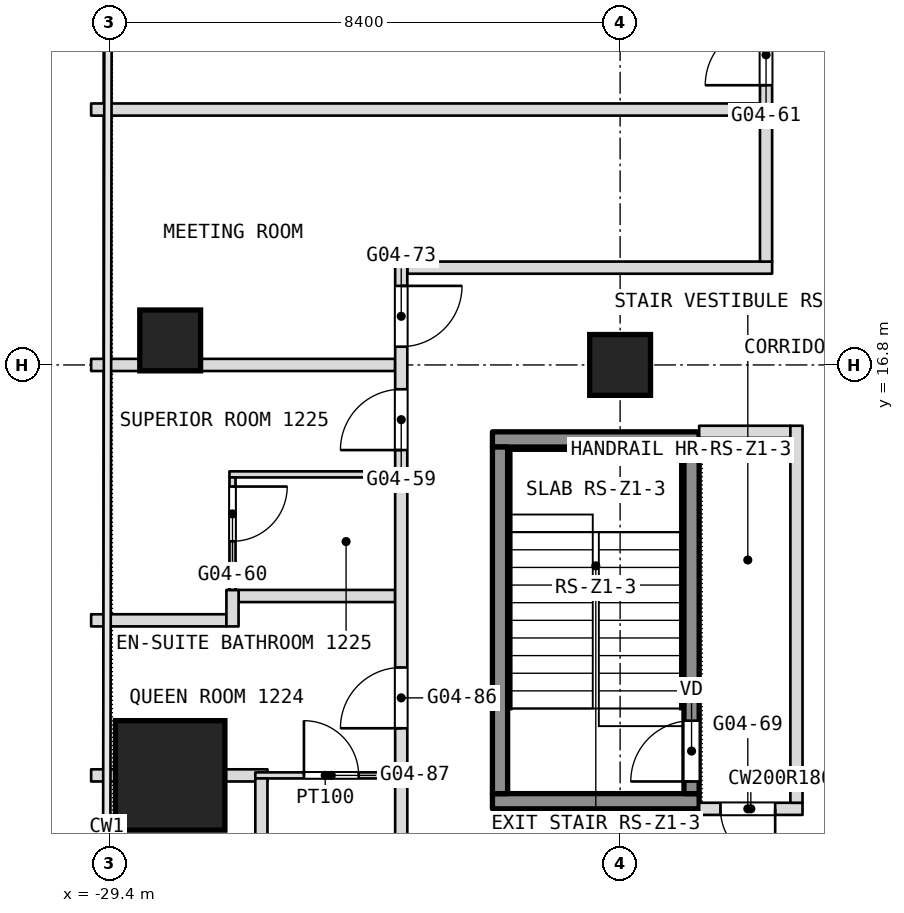
"""IFC4 building model, lengths in metres.
Left out: names, types, materials, properties, quantities, classifications, styles, units other than length and angle.
Written with IfcOpenShell. Run it as: python <this file> out.ifc"""

import sys

from ifc_helpers import new_model, si_unit, direction, frame, frame_2d, origin, origin_2d, place, context, subcontext, project, spatial, rectangle, extrude, element, fill, save


model = new_model("IFC4")
c1 = context("Model", 3, precision=1e-05, world=origin(), true_north=direction((0.0, 1.0)))
c2 = subcontext(c1, "Body", "Model", "MODEL_VIEW")
j1 = project(units=[si_unit("LENGTHUNIT", "METRE"), si_unit("PLANEANGLEUNIT", "RADIAN")], contexts=[c1])
p1 = place(None, origin())
s1 = spatial("IfcSite", under=j1, at=p1, CompositionType="ELEMENT")
p2 = place(p1, origin())
s2 = spatial("IfcBuilding", under=s1, at=p2, CompositionType="ELEMENT")
p3 = place(p2, frame((0.0, 0.0, 58.1)))
s3 = spatial("IfcBuildingStorey", under=s2, at=p3, CompositionType="ELEMENT", Elevation=58.1)
p4 = place(p3, frame((-28.4, 10.05, 0.0), z_axis=(0.0, 0.0, 1.0), x_axis=(1.0, 0.0, 0.0)))
e1 = element("IfcColumn", 1, at=p4, inside=s3, PredefinedType="COLUMN", context=c2, shape_type="SweptSolid", body=[
    extrude(rectangle(XDim=1.8, YDim=1.8, at=origin_2d()), origin(), (0.0, 0.0, 1.0), 3.6),
])
for number, where, z_axis, x_axis in (
    (2, (-21.0, 16.8, 0.0), (0.0, 0.0, 1.0), (1.0, 0.0, 0.0)),
    (3, (-28.4, 17.203, 0.0), (0.0, 0.0, 1.0), (1.0, 0.0, 0.0)),
):
    element("IfcColumn", number, at=place(p3, frame(where, z_axis=z_axis, x_axis=x_axis)), inside=s3, PredefinedType="COLUMN", context=c2, shape_type="SweptSolid", body=[
        extrude(rectangle(XDim=1.0, YDim=1.0, at=origin_2d()), origin(), (0.0, 0.0, 1.0), 3.6),
    ])
p5 = place(p3, frame((-19.7, 9.5, 0.0), z_axis=(0.0, 0.0, 1.0), x_axis=(1.0, 0.0, 0.0)))
e4 = element("IfcWall", 4, at=p5, inside=s3, PredefinedType="PARTITIONING", context=c2, shape_type="SweptSolid", body=[
    extrude(rectangle(XDim=1.7, YDim=0.2, at=frame_2d((0.85, 0.0))), origin(), (0.0, 0.0, 1.0), 3.34),
])
p6 = place(p5, frame((0.35, 0.0, 0.0)))
e5 = element("IfcOpeningElement", 5, at=p6, cuts=e4, PredefinedType="OPENING", context=c2, shape_type="SweptSolid", body=[
    extrude(rectangle(XDim=0.9, YDim=2.1, at=frame_2d((0.45, 1.05))), frame((0.0, 0.1, 0.0), z_axis=(0.0, -1.0, 0.0), x_axis=(1.0, 0.0, 0.0)), (0.0, 0.0, 1.0), 0.2),
])
p7 = place(p3, frame((-29.7, 10.05, 0.0), z_axis=(0.0, 0.0, 1.0), x_axis=(1.0, 0.0, 0.0)))
e6 = element("IfcWall", 6, at=p7, inside=s3, PredefinedType="PARTITIONING", context=c2, shape_type="SweptSolid", body=[
    extrude(rectangle(XDim=0.4, YDim=0.2, at=frame_2d((0.2, 0.0))), origin(), (0.0, 0.0, 1.0), 3.34),
])
p8 = place(p3, frame((-27.5, 10.05, 0.0), z_axis=(0.0, 0.0, 1.0), x_axis=(1.0, 0.0, 0.0)))
e7 = element("IfcWall", 7, at=p8, inside=s3, PredefinedType="PARTITIONING", context=c2, shape_type="SweptSolid", body=[
    extrude(rectangle(XDim=0.7, YDim=0.2, at=frame_2d((0.35, 0.0))), origin(), (0.0, 0.0, 1.0), 3.34),
])
p9 = place(p3, frame((-27.0, 10.05, 0.0), z_axis=(0.0, 0.0, 1.0), x_axis=(1.0, 0.0, 0.0)))
e8 = element("IfcWall", 8, at=p9, inside=s3, PredefinedType="PARTITIONING", context=c2, shape_type="SweptSolid", body=[
    extrude(rectangle(XDim=2.3, YDim=0.1, at=frame_2d((1.15, 0.0))), origin(), (0.0, 0.0, 1.0), 3.34),
])
p10 = place(p9, frame((0.8, 0.0, 0.0)))
e9 = element("IfcOpeningElement", 9, at=p10, cuts=e8, PredefinedType="OPENING", context=c2, shape_type="SweptSolid", body=[
    extrude(rectangle(XDim=0.9, YDim=2.1, at=frame_2d((0.45, 1.05))), frame((0.0, 0.05, 0.0), z_axis=(0.0, -1.0, 0.0), x_axis=(1.0, 0.0, 0.0)), (0.0, 0.0, 1.0), 0.1),
])
p11 = place(p3, frame((-29.7, 12.6, 0.0), z_axis=(0.0, 0.0, 1.0), x_axis=(1.0, 0.0, 0.0)))
e10 = element("IfcWall", 10, at=p11, inside=s3, PredefinedType="PARTITIONING", context=c2, shape_type="SweptSolid", body=[
    extrude(rectangle(XDim=2.225, YDim=0.2, at=frame_2d((1.112, 0.0))), origin(), (0.0, 0.0, 1.0), 3.34),
])
p12 = place(p3, frame((-27.275, 13.0, 0.0), z_axis=(0.0, 0.0, 1.0), x_axis=(1.0, 0.0, 0.0)))
e11 = element("IfcWall", 11, at=p12, inside=s3, PredefinedType="PARTITIONING", context=c2, shape_type="SweptSolid", body=[
    extrude(rectangle(XDim=2.575, YDim=0.2, at=frame_2d((1.288, 0.0))), origin(), (0.0, 0.0, 1.0), 3.34),
])
p13 = place(p3, frame((-27.425, 15.0, 0.0), z_axis=(0.0, 0.0, 1.0), x_axis=(1.0, 0.0, 0.0)))
e12 = element("IfcWall", 12, at=p13, inside=s3, PredefinedType="PARTITIONING", context=c2, shape_type="SweptSolid", body=[
    extrude(rectangle(XDim=2.725, YDim=0.1, at=frame_2d((1.363, 0.0))), origin(), (0.0, 0.0, 1.0), 3.34),
])
p14 = place(p3, frame((-19.7, 15.7, 0.0), z_axis=(0.0, 0.0, 1.0), x_axis=(1.0, 0.0, 0.0)))
e13 = element("IfcWall", 13, at=p14, inside=s3, PredefinedType="PARTITIONING", context=c2, shape_type="SweptSolid", body=[
    extrude(rectangle(XDim=1.5, YDim=0.2, at=frame_2d((0.75, 0.0))), origin(), (0.0, 0.0, 1.0), 3.34),
])
p15 = place(p3, frame((-29.7, 16.8, 0.0), z_axis=(0.0, 0.0, 1.0), x_axis=(1.0, 0.0, 0.0)))
e14 = element("IfcWall", 14, at=p15, inside=s3, PredefinedType="PARTITIONING", context=c2, shape_type="SweptSolid", body=[
    extrude(rectangle(XDim=5.0, YDim=0.2, at=frame_2d((2.5, 0.0))), origin(), (0.0, 0.0, 1.0), 2.84),
])
p16 = place(p3, frame((-18.1, 9.6, 0.0), z_axis=(0.0, 0.0, 1.0), x_axis=(0.0, 1.0, 0.0)))
e15 = element("IfcWall", 15, at=p16, inside=s3, PredefinedType="PARTITIONING", context=c2, shape_type="SweptSolid", body=[
    extrude(rectangle(XDim=6.2, YDim=0.2, at=frame_2d((3.1, 0.0))), origin(), (0.0, 0.0, 1.0), 3.34),
])
p17 = place(p3, frame((-24.5, 18.4, 0.0), z_axis=(0.0, 0.0, 1.0), x_axis=(1.0, 0.0, 0.0)))
e16 = element("IfcWall", 16, at=p17, inside=s3, PredefinedType="PARTITIONING", context=c2, shape_type="SweptSolid", body=[
    extrude(rectangle(XDim=6.0, YDim=0.2, at=frame_2d((3.0, 0.0))), origin(), (0.0, 0.0, 1.0), 3.34),
])
p18 = place(p3, frame((-18.6, 18.5, 0.0), z_axis=(0.0, 0.0, 1.0), x_axis=(0.0, 1.0, 0.0)))
e17 = element("IfcWall", 17, at=p18, inside=s3, PredefinedType="PARTITIONING", context=c2, shape_type="SweptSolid", body=[
    extrude(rectangle(XDim=15.04, YDim=0.2, at=frame_2d((7.52, 0.0))), origin(), (0.0, 0.0, 1.0), 3.34),
])
p19 = place(p18, frame((2.9, 0.0, 0.0)))
e18 = element("IfcOpeningElement", 18, at=p19, cuts=e17, PredefinedType="OPENING", context=c2, shape_type="SweptSolid", body=[
    extrude(rectangle(XDim=1.0, YDim=2.1, at=frame_2d((0.5, 1.05))), frame((0.0, 0.1, 0.0), z_axis=(0.0, -1.0, 0.0), x_axis=(1.0, 0.0, 0.0)), (0.0, 0.0, 1.0), 0.2),
])
p20 = place(p18, frame((7.1, 0.0, 0.0)))
e19 = element("IfcOpeningElement", 19, at=p20, cuts=e17, PredefinedType="OPENING", context=c2, shape_type="SweptSolid", body=[
    extrude(rectangle(XDim=1.0, YDim=2.1, at=frame_2d((0.5, 1.05))), frame((0.0, 0.1, 0.0), z_axis=(0.0, -1.0, 0.0), x_axis=(1.0, 0.0, 0.0)), (0.0, 0.0, 1.0), 0.2),
])
p21 = place(p18, frame((11.2, 0.0, 0.0)))
e20 = element("IfcOpeningElement", 20, at=p21, cuts=e17, PredefinedType="OPENING", context=c2, shape_type="SweptSolid", body=[
    extrude(rectangle(XDim=1.0, YDim=2.1, at=frame_2d((0.5, 1.05))), frame((0.0, 0.1, 0.0), z_axis=(0.0, -1.0, 0.0), x_axis=(1.0, 0.0, 0.0)), (0.0, 0.0, 1.0), 0.2),
])
p22 = place(p3, frame((-29.7, 21.0, 0.0), z_axis=(0.0, 0.0, 1.0), x_axis=(1.0, 0.0, 0.0)))
e21 = element("IfcWall", 21, at=p22, inside=s3, PredefinedType="PARTITIONING", context=c2, shape_type="SweptSolid", body=[
    extrude(rectangle(XDim=11.0, YDim=0.2, at=frame_2d((5.5, 0.0))), origin(), (0.0, 0.0, 1.0), 3.34),
])
p23 = place(p3, frame((-24.6, 6.9, 0.0), z_axis=(0.0, 0.0, 1.0), x_axis=(0.0, 1.0, 0.0)))
e22 = element("IfcWall", 22, at=p23, inside=s3, PredefinedType="PARTITIONING", context=c2, shape_type="SweptSolid", body=[
    extrude(rectangle(XDim=11.6, YDim=0.2, at=frame_2d((5.8, 0.0))), origin(), (0.0, 0.0, 1.0), 3.34),
])
p24 = place(p23, frame((8.5, 0.0, 0.0)))
e23 = element("IfcOpeningElement", 23, at=p24, cuts=e22, PredefinedType="OPENING", context=c2, shape_type="SweptSolid", body=[
    extrude(rectangle(XDim=1.0, YDim=2.1, at=frame_2d((0.5, 1.05))), frame((0.0, 0.1, 0.0), z_axis=(0.0, -1.0, 0.0), x_axis=(1.0, 0.0, 0.0)), (0.0, 0.0, 1.0), 0.2),
])
p25 = place(p23, frame((10.2, 0.0, 0.0)))
e24 = element("IfcOpeningElement", 24, at=p25, cuts=e22, PredefinedType="OPENING", context=c2, shape_type="SweptSolid", body=[
    extrude(rectangle(XDim=1.0, YDim=2.1, at=frame_2d((0.5, 1.05))), frame((0.0, 0.1, 0.0), z_axis=(0.0, -1.0, 0.0), x_axis=(1.0, 0.0, 0.0)), (0.0, 0.0, 1.0), 0.2),
])
p26 = place(p23, frame((0.3, 0.0, 0.0)))
e25 = element("IfcOpeningElement", 25, at=p26, cuts=e22, PredefinedType="OPENING", context=c2, shape_type="SweptSolid", body=[
    extrude(rectangle(XDim=1.0, YDim=2.1, at=frame_2d((0.5, 1.05))), frame((0.0, 0.1, 0.0), z_axis=(0.0, -1.0, 0.0), x_axis=(1.0, 0.0, 0.0)), (0.0, 0.0, 1.0), 0.2),
])
p27 = place(p23, frame((3.925, 0.0, 0.0)))
e26 = element("IfcOpeningElement", 26, at=p27, cuts=e22, PredefinedType="OPENING", context=c2, shape_type="SweptSolid", body=[
    extrude(rectangle(XDim=1.0, YDim=2.1, at=frame_2d((0.5, 1.05))), frame((0.0, 0.1, 0.0), z_axis=(0.0, -1.0, 0.0), x_axis=(1.0, 0.0, 0.0)), (0.0, 0.0, 1.0), 0.2),
])
p28 = place(p3, frame((-26.9, 8.3, 0.0), z_axis=(0.0, 0.0, 1.0), x_axis=(0.0, 1.0, 0.0)))
e27 = element("IfcWall", 27, at=p28, inside=s3, PredefinedType="PARTITIONING", context=c2, shape_type="SweptSolid", body=[
    extrude(rectangle(XDim=1.7, YDim=0.2, at=frame_2d((0.85, 0.0))), origin(), (0.0, 0.0, 1.0), 3.34),
])
p29 = place(p3, frame((-27.375, 12.5, 0.0), z_axis=(0.0, 0.0, 1.0), x_axis=(0.0, 1.0, 0.0)))
e28 = element("IfcWall", 28, at=p29, inside=s3, PredefinedType="PARTITIONING", context=c2, shape_type="SweptSolid", body=[
    extrude(rectangle(XDim=0.6, YDim=0.2, at=frame_2d((0.3, 0.0))), origin(), (0.0, 0.0, 1.0), 3.34),
])
p30 = place(p3, frame((-27.375, 13.1, 0.0), z_axis=(0.0, 0.0, 1.0), x_axis=(0.0, 1.0, 0.0)))
e29 = element("IfcWall", 29, at=p30, inside=s3, PredefinedType="PARTITIONING", context=c2, shape_type="SweptSolid", body=[
    extrude(rectangle(XDim=1.85, YDim=0.1, at=frame_2d((0.925, 0.0))), origin(), (0.0, 0.0, 1.0), 3.34),
])
p31 = place(p30, frame((0.8, 0.0, 0.0)))
e30 = element("IfcOpeningElement", 30, at=p31, cuts=e29, PredefinedType="OPENING", context=c2, shape_type="SweptSolid", body=[
    extrude(rectangle(XDim=0.9, YDim=2.1, at=frame_2d((0.45, 1.05))), frame((0.0, 0.05, 0.0), z_axis=(0.0, -1.0, 0.0), x_axis=(1.0, 0.0, 0.0)), (0.0, 0.0, 1.0), 0.1),
])
for number, where, z_axis, x_axis in (
    (31, (-23.1, 9.625, 0.1), (0.0, 0.0, 1.0), (1.0, 0.0, 0.0)),
    (32, (-23.1, 15.575, 0.1), (0.0, 0.0, 1.0), (1.0, 0.0, 0.0)),
):
    element("IfcWall", number, at=place(p3, frame(where, z_axis=z_axis, x_axis=x_axis)), inside=s3, PredefinedType="SHEAR", context=c2, shape_type="SweptSolid", body=[
        extrude(rectangle(XDim=3.4, YDim=0.25, at=frame_2d((1.7, 0.0))), origin(), (0.0, 0.0, 1.0), 3.6),
    ])
p32 = place(p3, frame((-22.975, 9.75, 0.1), z_axis=(0.0, 0.0, 1.0), x_axis=(0.0, 1.0, 0.0)))
e33 = element("IfcWall", 33, at=p32, inside=s3, PredefinedType="SHEAR", context=c2, shape_type="SweptSolid", body=[
    extrude(rectangle(XDim=5.7, YDim=0.25, at=frame_2d((2.85, 0.0))), origin(), (0.0, 0.0, 1.0), 3.6),
])
p33 = place(p3, frame((-19.825, 9.75, 0.1), z_axis=(0.0, 0.0, 1.0), x_axis=(0.0, 1.0, 0.0)))
e34 = element("IfcWall", 34, at=p33, inside=s3, PredefinedType="SHEAR", context=c2, shape_type="SweptSolid", body=[
    extrude(rectangle(XDim=5.7, YDim=0.25, at=frame_2d((2.85, 0.0))), origin(), (0.0, 0.0, 1.0), 3.6),
])
p34 = place(p33, frame((0.2, 0.0, 0.0)))
e35 = element("IfcOpeningElement", 35, at=p34, cuts=e34, PredefinedType="OPENING", context=c2, shape_type="SweptSolid", body=[
    extrude(rectangle(XDim=1.0, YDim=2.1, at=frame_2d((0.5, 1.05))), frame((0.0, 0.125, 0.0), z_axis=(0.0, -1.0, 0.0), x_axis=(1.0, 0.0, 0.0)), (0.0, 0.0, 1.0), 0.25),
])
p35 = place(p6, origin())
e36 = element("IfcDoor", 36, at=p35, inside=s3, OperationType="SINGLE_SWING_RIGHT", PredefinedType="DOOR", context=c2, shape_type="SweptSolid", body=[
    extrude(rectangle(XDim=0.9, YDim=2.1, at=frame_2d((0.45, 1.05))), frame((0.0, 0.025, 0.0), z_axis=(0.0, -1.0, 0.0), x_axis=(1.0, 0.0, 0.0)), (0.0, 0.0, 1.0), 0.05),
])
fill(e5, e36)
p36 = place(p10, origin())
e37 = element("IfcDoor", 37, at=p36, inside=s3, OperationType="SINGLE_SWING_LEFT", PredefinedType="DOOR", context=c2, shape_type="SweptSolid", body=[
    extrude(rectangle(XDim=0.9, YDim=2.1, at=frame_2d((0.45, 1.05))), frame((0.0, 0.025, 0.0), z_axis=(0.0, -1.0, 0.0), x_axis=(1.0, 0.0, 0.0)), (0.0, 0.0, 1.0), 0.05),
])
fill(e9, e37)
p37 = place(p19, origin())
e38 = element("IfcDoor", 38, at=p37, inside=s3, OperationType="SINGLE_SWING_RIGHT", PredefinedType="DOOR", context=c2, shape_type="SweptSolid", body=[
    extrude(rectangle(XDim=1.0, YDim=2.1, at=frame_2d((0.5, 1.05))), frame((0.0, 0.025, 0.0), z_axis=(0.0, -1.0, 0.0), x_axis=(1.0, 0.0, 0.0)), (0.0, 0.0, 1.0), 0.05),
])
fill(e18, e38)
p38 = place(p24, origin())
e39 = element("IfcDoor", 39, at=p38, inside=s3, OperationType="SINGLE_SWING_RIGHT", PredefinedType="DOOR", context=c2, shape_type="SweptSolid", body=[
    extrude(rectangle(XDim=1.0, YDim=2.1, at=frame_2d((0.5, 1.05))), frame((0.0, 0.025, 0.0), z_axis=(0.0, -1.0, 0.0), x_axis=(1.0, 0.0, 0.0)), (0.0, 0.0, 1.0), 0.05),
])
fill(e23, e39)
p39 = place(p25, origin())
e40 = element("IfcDoor", 40, at=p39, inside=s3, OperationType="SINGLE_SWING_LEFT", PredefinedType="DOOR", context=c2, shape_type="SweptSolid", body=[
    extrude(rectangle(XDim=1.0, YDim=2.1, at=frame_2d((0.5, 1.05))), frame((0.0, 0.025, 0.0), z_axis=(0.0, -1.0, 0.0), x_axis=(1.0, 0.0, 0.0)), (0.0, 0.0, 1.0), 0.05),
])
fill(e24, e40)
p40 = place(p27, origin())
e41 = element("IfcDoor", 41, at=p40, inside=s3, OperationType="SINGLE_SWING_LEFT", PredefinedType="DOOR", context=c2, shape_type="SweptSolid", body=[
    extrude(rectangle(XDim=1.0, YDim=2.1, at=frame_2d((0.5, 1.05))), frame((0.0, 0.025, 0.0), z_axis=(0.0, -1.0, 0.0), x_axis=(1.0, 0.0, 0.0)), (0.0, 0.0, 1.0), 0.05),
])
fill(e26, e41)
p41 = place(p31, origin())
e42 = element("IfcDoor", 42, at=p41, inside=s3, OperationType="SINGLE_SWING_LEFT", PredefinedType="DOOR", context=c2, shape_type="SweptSolid", body=[
    extrude(rectangle(XDim=0.9, YDim=2.1, at=frame_2d((0.45, 1.05))), frame((0.0, 0.025, 0.0), z_axis=(0.0, -1.0, 0.0), x_axis=(1.0, 0.0, 0.0)), (0.0, 0.0, 1.0), 0.05),
])
fill(e30, e42)
p42 = place(p34, origin())
e43 = element("IfcDoor", 43, at=p42, inside=s3, OperationType="SINGLE_SWING_LEFT", PredefinedType="DOOR", context=c2, shape_type="SweptSolid", body=[
    extrude(rectangle(XDim=1.0, YDim=2.1, at=frame_2d((0.5, 1.05))), frame((0.0, 0.025, 0.0), z_axis=(0.0, -1.0, 0.0), x_axis=(1.0, 0.0, 0.0)), (0.0, 0.0, 1.0), 0.05),
])
fill(e35, e43)
save(model, sys.argv[1])
